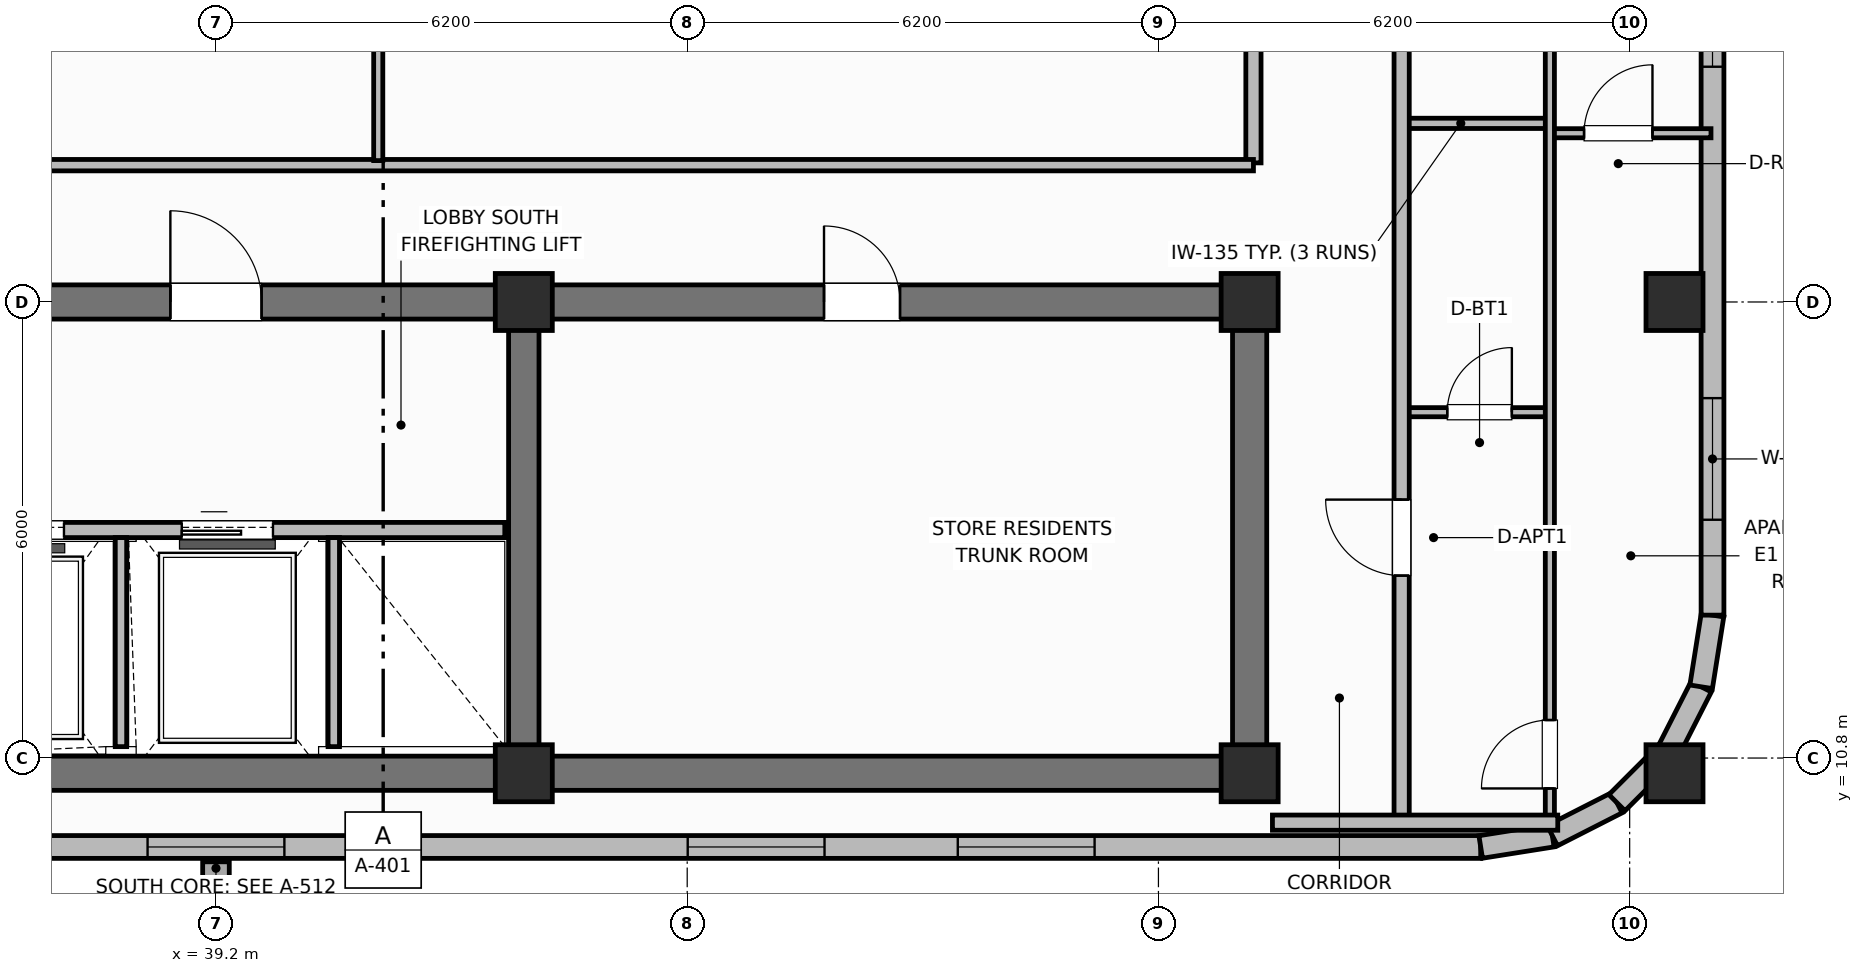
"""IFC4 building model, lengths in metres.
Left out: names, types, materials, properties, quantities, classifications, styles, units other than length and angle.
Written with IfcOpenShell. Run it as: python <this file> out.ifc"""

import sys

from ifc_helpers import new_model, si_unit, direction, frame, frame_2d, origin, origin_2d, place, context, subcontext, project, spatial, rectangle, extrude, element, fill, save


model = new_model("IFC4")
c1 = context("Model", 3, precision=1e-05, world=origin(), true_north=direction((0.0, 1.0)))
c2 = subcontext(c1, "Body", "Model", "MODEL_VIEW")
j1 = project(units=[si_unit("LENGTHUNIT", "METRE"), si_unit("PLANEANGLEUNIT", "RADIAN")], contexts=[c1])
p1 = place(None, origin())
s1 = spatial("IfcSite", under=j1, at=p1, CompositionType="ELEMENT")
p2 = place(p1, origin())
s2 = spatial("IfcBuilding", under=s1, at=p2, CompositionType="ELEMENT")
p3 = place(p2, frame((0.0, 0.0, 260.2)))
s3 = spatial("IfcBuildingStorey", under=s2, at=p3, CompositionType="ELEMENT", Elevation=260.2)
p4 = place(p3, frame((52.8, 10.6, 0.0), z_axis=(0.0, 0.0, 1.0), x_axis=(-1.0, 0.0, 0.0)))
e1 = element("IfcWall", 1, at=p4, inside=s3, PredefinedType="SHEAR", context=c2, shape_type="SweptSolid", body=[
    extrude(rectangle(XDim=27.2, YDim=0.45, at=frame_2d((13.6, 0.0))), origin(), (0.0, 0.0, 1.0), 3.7),
])
p5 = place(p3, frame((52.8, 10.825, 0.0), z_axis=(0.0, 0.0, 1.0), x_axis=(0.0, 1.0, 0.0)))
e2 = element("IfcWall", 2, at=p5, inside=s3, PredefinedType="SHEAR", context=c2, shape_type="SweptSolid", body=[
    extrude(rectangle(XDim=5.75, YDim=0.45, at=frame_2d((2.875, 0.0))), origin(), (0.0, 0.0, 1.0), 3.7),
])
p6 = place(p3, frame((25.6, 16.8, 0.0), z_axis=(0.0, 0.0, 1.0), x_axis=(1.0, 0.0, 0.0)))
e3 = element("IfcWall", 3, at=p6, inside=s3, PredefinedType="SHEAR", context=c2, shape_type="SweptSolid", body=[
    extrude(rectangle(XDim=27.2, YDim=0.45, at=frame_2d((13.6, 0.0))), origin(), (0.0, 0.0, 1.0), 3.7),
])
p7 = place(p6, frame((1.9, 0.0, 0.0)))
e4 = element("IfcOpeningElement", 4, at=p7, cuts=e3, PredefinedType="OPENING", context=c2, shape_type="SweptSolid", body=[
    extrude(rectangle(XDim=1.1, YDim=2.15, at=frame_2d((0.55, 1.075))), frame((0.0, 0.235, 0.0), z_axis=(0.0, -1.0, 0.0), x_axis=(1.0, 0.0, 0.0)), (0.0, 0.0, 1.0), 0.47),
])
p8 = place(p6, frame((13.0, 0.0, 0.0)))
e5 = element("IfcOpeningElement", 5, at=p8, cuts=e3, PredefinedType="OPENING", context=c2, shape_type="SweptSolid", body=[
    extrude(rectangle(XDim=1.2, YDim=2.15, at=frame_2d((0.6, 1.075))), frame((0.0, 0.235, 0.0), z_axis=(0.0, -1.0, 0.0), x_axis=(1.0, 0.0, 0.0)), (0.0, 0.0, 1.0), 0.47),
])
p9 = place(p6, frame((21.6, 0.0, 0.0)))
e6 = element("IfcOpeningElement", 6, at=p9, cuts=e3, PredefinedType="OPENING", context=c2, shape_type="SweptSolid", body=[
    extrude(rectangle(XDim=1.0, YDim=2.15, at=frame_2d((0.5, 1.075))), frame((0.0, 0.235, 0.0), z_axis=(0.0, -1.0, 0.0), x_axis=(1.0, 0.0, 0.0)), (0.0, 0.0, 1.0), 0.47),
])
p10 = place(p3, frame((43.25, 10.825, 0.0), z_axis=(0.0, 0.0, 1.0), x_axis=(0.0, 1.0, 0.0)))
e7 = element("IfcWall", 7, at=p10, inside=s3, PredefinedType="SHEAR", context=c2, shape_type="SweptSolid", body=[
    extrude(rectangle(XDim=5.75, YDim=0.4, at=frame_2d((2.875, 0.0))), origin(), (0.0, 0.0, 1.0), 3.7),
])
for number, where, z_axis, x_axis in (
    (8, (43.25, 10.6, 0.0), (0.0, 0.0, 1.0), (1.0, 0.0, 0.0)),
    (9, (43.25, 16.8, 0.0), (0.0, 0.0, 1.0), (1.0, 0.0, 0.0)),
    (10, (52.8, 10.6, 0.0), (0.0, 0.0, 1.0), (1.0, 0.0, 0.0)),
    (11, (52.8, 16.8, 0.0), (0.0, 0.0, 1.0), (1.0, 0.0, 0.0)),
    (12, (58.39, 10.6, 0.0), (0.0, 0.0, 1.0), (1.0, 0.0, 0.0)),
    (13, (58.39, 16.8, 0.0), (0.0, 0.0, 1.0), (1.0, 0.0, 0.0)),
):
    element("IfcColumn", number, at=place(p3, frame(where, z_axis=z_axis, x_axis=x_axis)), inside=s3, PredefinedType="COLUMN", context=c2, shape_type="SweptSolid", body=[
        extrude(rectangle(XDim=0.75, YDim=0.75, at=origin_2d()), origin(), (0.0, 0.0, 1.0), 3.7),
    ])
p11 = place(p3, frame((22.56, 9.63, 0.0), z_axis=(0.0, 0.0, 1.0), x_axis=(1.0, 0.0, 0.0)))
e14 = element("IfcWall", 14, at=p11, inside=s3, PredefinedType="SOLIDWALL", context=c2, shape_type="SweptSolid", body=[
    extrude(rectangle(XDim=33.28, YDim=0.3, at=frame_2d((16.64, 0.0))), origin(), (0.0, 0.0, 1.0), 2.73),
])
p12 = place(p11, frame((5.08, 0.0, 0.76)))
e15 = element("IfcOpeningElement", 15, at=p12, cuts=e14, PredefinedType="OPENING", context=c2, shape_type="SweptSolid", body=[
    extrude(rectangle(XDim=1.8, YDim=1.85, at=frame_2d((0.9, 0.925))), frame((0.0, 0.16, 0.0), z_axis=(0.0, -1.0, 0.0), x_axis=(1.0, 0.0, 0.0)), (0.0, 0.0, 1.0), 0.32),
])
p13 = place(p11, frame((8.633, 0.0, 0.76)))
e16 = element("IfcOpeningElement", 16, at=p13, cuts=e14, PredefinedType="OPENING", context=c2, shape_type="SweptSolid", body=[
    extrude(rectangle(XDim=1.8, YDim=1.85, at=frame_2d((0.9, 0.925))), frame((0.0, 0.16, 0.0), z_axis=(0.0, -1.0, 0.0), x_axis=(1.0, 0.0, 0.0)), (0.0, 0.0, 1.0), 0.32),
])
p14 = place(p11, frame((15.74, 0.0, 0.76)))
e17 = element("IfcOpeningElement", 17, at=p14, cuts=e14, PredefinedType="OPENING", context=c2, shape_type="SweptSolid", body=[
    extrude(rectangle(XDim=1.8, YDim=1.85, at=frame_2d((0.9, 0.925))), frame((0.0, 0.16, 0.0), z_axis=(0.0, -1.0, 0.0), x_axis=(1.0, 0.0, 0.0)), (0.0, 0.0, 1.0), 0.32),
])
p15 = place(p11, frame((22.847, 0.0, 0.76)))
e18 = element("IfcOpeningElement", 18, at=p15, cuts=e14, PredefinedType="OPENING", context=c2, shape_type="SweptSolid", body=[
    extrude(rectangle(XDim=1.8, YDim=1.85, at=frame_2d((0.9, 0.925))), frame((0.0, 0.16, 0.0), z_axis=(0.0, -1.0, 0.0), x_axis=(1.0, 0.0, 0.0)), (0.0, 0.0, 1.0), 0.32),
])
p16 = place(p11, frame((26.4, 0.0, 0.76)))
e19 = element("IfcOpeningElement", 19, at=p16, cuts=e14, PredefinedType="OPENING", context=c2, shape_type="SweptSolid", body=[
    extrude(rectangle(XDim=1.8, YDim=1.85, at=frame_2d((0.9, 0.925))), frame((0.0, 0.16, 0.0), z_axis=(0.0, -1.0, 0.0), x_axis=(1.0, 0.0, 0.0)), (0.0, 0.0, 1.0), 0.32),
])
p17 = place(p3, frame((55.84, 9.63, 0.0), z_axis=(0.0, 0.0, 1.0), x_axis=(0.987663181641, 0.156593229835, 0.0)))
e20 = element("IfcWall", 20, at=p17, inside=s3, PredefinedType="SOLIDWALL", context=c2, shape_type="SweptSolid", body=[
    extrude(rectangle(XDim=0.954, YDim=0.3, at=frame_2d((0.477, 0.0))), origin(), (0.0, 0.0, 1.0), 2.73),
])
for number, where, z_axis, x_axis in (
    (21, (56.782, 9.779, 0.0), (0.0, 0.0, 1.0), (0.891, 0.454, 0.0)),
    (22, (57.633, 10.212, 0.0), (0.0, 0.0, 1.0), (0.707, 0.707, 0.0)),
    (23, (58.308, 10.887, 0.0), (0.0, 0.0, 1.0), (0.454, 0.891, 0.0)),
):
    element("IfcWall", number, at=place(p3, frame(where, z_axis=z_axis, x_axis=x_axis)), inside=s3, PredefinedType="SOLIDWALL", context=c2, shape_type="SweptSolid", body=[
        extrude(rectangle(XDim=0.954, YDim=0.3, at=frame_2d((0.477, 0.0))), origin(), (0.0, 0.0, 1.0), 2.73),
    ])
p18 = place(p3, frame((58.741, 11.738, 0.0), z_axis=(0.0, 0.0, 1.0), x_axis=(0.156343617883, 0.987702725088, 0.0)))
e24 = element("IfcWall", 24, at=p18, inside=s3, PredefinedType="SOLIDWALL", context=c2, shape_type="SweptSolid", body=[
    extrude(rectangle(XDim=0.954, YDim=0.3, at=frame_2d((0.477, 0.0))), origin(), (0.0, 0.0, 1.0), 2.73),
])
p19 = place(p3, frame((58.89, 12.68, 0.0), z_axis=(0.0, 0.0, 1.0), x_axis=(0.0, 1.0, 0.0)))
e25 = element("IfcWall", 25, at=p19, inside=s3, PredefinedType="SOLIDWALL", context=c2, shape_type="SweptSolid", body=[
    extrude(rectangle(XDim=11.12, YDim=0.3, at=frame_2d((5.56, 0.0))), origin(), (0.0, 0.0, 1.0), 2.73),
])
p20 = place(p19, frame((1.255, 0.0, 0.71)))
e26 = element("IfcOpeningElement", 26, at=p20, cuts=e25, PredefinedType="OPENING", context=c2, shape_type="SweptSolid", body=[
    extrude(rectangle(XDim=1.6, YDim=1.9, at=frame_2d((0.8, 0.95))), frame((0.0, 0.16, 0.0), z_axis=(0.0, -1.0, 0.0), x_axis=(1.0, 0.0, 0.0)), (0.0, 0.0, 1.0), 0.32),
])
p21 = place(p19, frame((7.215, 0.0, 0.71)))
e27 = element("IfcOpeningElement", 27, at=p21, cuts=e25, PredefinedType="OPENING", context=c2, shape_type="SweptSolid", body=[
    extrude(rectangle(XDim=1.6, YDim=1.9, at=frame_2d((0.8, 0.95))), frame((0.0, 0.16, 0.0), z_axis=(0.0, -1.0, 0.0), x_axis=(1.0, 0.0, 0.0)), (0.0, 0.0, 1.0), 0.32),
])
p22 = place(p3, frame((35.4, 13.8, 0.0), z_axis=(0.0, 0.0, 1.0), x_axis=(1.0, 0.0, 0.0)))
e28 = element("IfcWall", 28, at=p22, inside=s3, PredefinedType="PARTITIONING", context=c2, shape_type="SweptSolid", body=[
    extrude(rectangle(XDim=7.6, YDim=0.2, at=frame_2d((3.8, 0.0))), origin(), (0.0, 0.0, 1.0), 2.33),
])
p23 = place(p22, frame((0.7, 0.0, 0.0)))
e29 = element("IfcOpeningElement", 29, at=p23, cuts=e28, PredefinedType="OPENING", context=c2, shape_type="SweptSolid", body=[
    extrude(rectangle(XDim=1.1, YDim=2.15, at=frame_2d((0.55, 1.075))), frame((0.0, 0.11, 0.0), z_axis=(0.0, -1.0, 0.0), x_axis=(1.0, 0.0, 0.0)), (0.0, 0.0, 1.0), 0.22),
])
p24 = place(p22, frame((3.35, 0.0, 0.0)))
e30 = element("IfcOpeningElement", 30, at=p24, cuts=e28, PredefinedType="OPENING", context=c2, shape_type="SweptSolid", body=[
    extrude(rectangle(XDim=1.2, YDim=2.15, at=frame_2d((0.6, 1.075))), frame((0.0, 0.11, 0.0), z_axis=(0.0, -1.0, 0.0), x_axis=(1.0, 0.0, 0.0)), (0.0, 0.0, 1.0), 0.22),
])
for number, where, z_axis, x_axis in (
    (31, (37.95, 10.95, 0.0), (0.0, 0.0, 1.0), (0.0, 1.0, 0.0)),
    (32, (40.75, 10.95, 0.0), (0.0, 0.0, 1.0), (0.0, 1.0, 0.0)),
):
    element("IfcWall", number, at=place(p3, frame(where, z_axis=z_axis, x_axis=x_axis)), inside=s3, PredefinedType="PARTITIONING", context=c2, shape_type="SweptSolid", body=[
        extrude(rectangle(XDim=2.75, YDim=0.15, at=frame_2d((1.375, 0.0))), origin(), (0.0, 0.0, 1.0), 2.56),
    ])
p25 = place(p3, frame((52.85, 18.63, 0.0), z_axis=(0.0, 0.0, 1.0), x_axis=(0.0, 1.0, 0.0)))
e33 = element("IfcWall", 33, at=p25, inside=s3, PredefinedType="PARTITIONING", context=c2, shape_type="SweptSolid", body=[
    extrude(rectangle(XDim=19.14, YDim=0.2, at=frame_2d((9.57, 0.0))), origin(), (0.0, 0.0, 1.0), 2.56),
])
p26 = place(p3, frame((29.9, 18.6, 0.0), z_axis=(0.0, 0.0, 1.0), x_axis=(1.0, 0.0, 0.0)))
e34 = element("IfcWall", 34, at=p26, inside=s3, PredefinedType="PARTITIONING", context=c2, shape_type="SweptSolid", body=[
    extrude(rectangle(XDim=22.95, YDim=0.15, at=frame_2d((11.475, 0.0))), origin(), (0.0, 0.0, 1.0), 2.56),
])
p27 = place(p3, frame((41.335, 18.66, 0.0), z_axis=(0.0, 0.0, 1.0), x_axis=(0.0, 1.0, 0.0)))
e35 = element("IfcWall", 35, at=p27, inside=s3, PredefinedType="PARTITIONING", context=c2, shape_type="SweptSolid", body=[
    extrude(rectangle(XDim=6.821, YDim=0.12, at=frame_2d((3.41, 0.0))), origin(), (0.0, 0.0, 1.0), 2.56),
])
p28 = place(p27, frame((2.0, 0.0, 0.0)))
e36 = element("IfcOpeningElement", 36, at=p28, cuts=e35, PredefinedType="OPENING", context=c2, shape_type="SweptSolid", body=[
    extrude(rectangle(XDim=0.9, YDim=2.1, at=frame_2d((0.45, 1.05))), frame((0.0, 0.07, 0.0), z_axis=(0.0, -1.0, 0.0), x_axis=(1.0, 0.0, 0.0)), (0.0, 0.0, 1.0), 0.14),
])
p29 = place(p3, frame((54.8, 15.35, 0.0), z_axis=(0.0, 0.0, 1.0), x_axis=(1.0, 0.0, 0.0)))
e37 = element("IfcWall", 37, at=p29, inside=s3, PredefinedType="PARTITIONING", context=c2, shape_type="SweptSolid", body=[
    extrude(rectangle(XDim=1.95, YDim=0.12, at=frame_2d((0.975, 0.0))), origin(), (0.0, 0.0, 1.0), 2.56),
])
p30 = place(p29, frame((0.6, 0.0, 0.0)))
e38 = element("IfcOpeningElement", 38, at=p30, cuts=e37, PredefinedType="OPENING", context=c2, shape_type="SweptSolid", body=[
    extrude(rectangle(XDim=0.85, YDim=2.1, at=frame_2d((0.425, 1.05))), frame((0.0, 0.07, 0.0), z_axis=(0.0, -1.0, 0.0), x_axis=(1.0, 0.0, 0.0)), (0.0, 0.0, 1.0), 0.14),
])
p31 = place(p3, frame((54.8, 19.15, 0.0), z_axis=(0.0, 0.0, 1.0), x_axis=(1.0, 0.0, 0.0)))
e39 = element("IfcWall", 39, at=p31, inside=s3, PredefinedType="PARTITIONING", context=c2, shape_type="SweptSolid", body=[
    extrude(rectangle(XDim=1.95, YDim=0.135, at=frame_2d((0.975, 0.0))), origin(), (0.0, 0.0, 1.0), 2.56),
])
p32 = place(p3, frame((56.75, 19.02, 0.0), z_axis=(0.0, 0.0, 1.0), x_axis=(1.0, 0.0, 0.0)))
e40 = element("IfcWall", 40, at=p32, inside=s3, PredefinedType="PARTITIONING", context=c2, shape_type="SweptSolid", body=[
    extrude(rectangle(XDim=2.12, YDim=0.12, at=frame_2d((1.06, 0.0))), origin(), (0.0, 0.0, 1.0), 2.56),
])
p33 = place(p32, frame((0.45, 0.0, 0.0)))
e41 = element("IfcOpeningElement", 41, at=p33, cuts=e40, PredefinedType="OPENING", context=c2, shape_type="SweptSolid", body=[
    extrude(rectangle(XDim=0.9, YDim=2.1, at=frame_2d((0.45, 1.05))), frame((0.0, 0.07, 0.0), z_axis=(0.0, -1.0, 0.0), x_axis=(1.0, 0.0, 0.0)), (0.0, 0.0, 1.0), 0.14),
])
p34 = place(p3, frame((56.75, 9.99, 0.0), z_axis=(0.0, 0.0, 1.0), x_axis=(0.0, 1.0, 0.0)))
e42 = element("IfcWall", 42, at=p34, inside=s3, PredefinedType="PARTITIONING", context=c2, shape_type="SweptSolid", body=[
    extrude(rectangle(XDim=36.42, YDim=0.12, at=frame_2d((18.21, 0.0))), origin(), (0.0, 0.0, 1.0), 2.56),
])
p35 = place(p34, frame((0.41, 0.0, 0.0)))
e43 = element("IfcOpeningElement", 43, at=p35, cuts=e42, PredefinedType="OPENING", context=c2, shape_type="SweptSolid", body=[
    extrude(rectangle(XDim=0.9, YDim=2.1, at=frame_2d((0.45, 1.05))), frame((0.0, 0.07, 0.0), z_axis=(0.0, -1.0, 0.0), x_axis=(1.0, 0.0, 0.0)), (0.0, 0.0, 1.0), 0.14),
])
p36 = place(p34, frame((15.56, 0.0, 0.0)))
e44 = element("IfcOpeningElement", 44, at=p36, cuts=e42, PredefinedType="OPENING", context=c2, shape_type="SweptSolid", body=[
    extrude(rectangle(XDim=0.82, YDim=2.08, at=frame_2d((0.41, 1.04))), frame((0.0, 0.07, 0.0), z_axis=(0.0, -1.0, 0.0), x_axis=(1.0, 0.0, 0.0)), (0.0, 0.0, 1.0), 0.14),
])
p37 = place(p3, frame((54.8, 9.95, 0.0), z_axis=(0.0, 0.0, 1.0), x_axis=(0.0, 1.0, 0.0)))
e45 = element("IfcWall", 45, at=p37, inside=s3, PredefinedType="PARTITIONING", context=c2, shape_type="SweptSolid", body=[
    extrude(rectangle(XDim=36.5, YDim=0.2, at=frame_2d((18.25, 0.0))), origin(), (0.0, 0.0, 1.0), 2.56),
])
p38 = place(p37, frame((3.25, 0.0, 0.0)))
e46 = element("IfcOpeningElement", 46, at=p38, cuts=e45, PredefinedType="OPENING", context=c2, shape_type="SweptSolid", body=[
    extrude(rectangle(XDim=1.0, YDim=2.15, at=frame_2d((0.5, 1.075))), frame((0.0, 0.11, 0.0), z_axis=(0.0, -1.0, 0.0), x_axis=(1.0, 0.0, 0.0)), (0.0, 0.0, 1.0), 0.22),
])
p39 = place(p3, frame((53.1, 9.95, 0.0), z_axis=(0.0, 0.0, 1.0), x_axis=(1.0, 0.0, 0.0)))
e47 = element("IfcWall", 47, at=p39, inside=s3, PredefinedType="PARTITIONING", context=c2, shape_type="SweptSolid", body=[
    extrude(rectangle(XDim=3.754, YDim=0.2, at=frame_2d((1.877, 0.0))), origin(), (0.0, 0.0, 1.0), 2.56),
])
p40 = place(p14, origin())
e48 = element("IfcWindow", 48, at=p40, inside=s3, PartitioningType="SINGLE_PANEL", PredefinedType="WINDOW", context=c2, shape_type="SweptSolid", body=[
    extrude(rectangle(XDim=1.8, YDim=1.85, at=frame_2d((0.9, 0.925))), frame((0.0, 0.03, 0.0), z_axis=(0.0, -1.0, 0.0), x_axis=(1.0, 0.0, 0.0)), (0.0, 0.0, 1.0), 0.06),
])
fill(e17, e48)
p41 = place(p15, origin())
e49 = element("IfcWindow", 49, at=p41, inside=s3, PartitioningType="SINGLE_PANEL", PredefinedType="WINDOW", context=c2, shape_type="SweptSolid", body=[
    extrude(rectangle(XDim=1.8, YDim=1.85, at=frame_2d((0.9, 0.925))), frame((0.0, 0.03, 0.0), z_axis=(0.0, -1.0, 0.0), x_axis=(1.0, 0.0, 0.0)), (0.0, 0.0, 1.0), 0.06),
])
fill(e18, e49)
p42 = place(p16, origin())
e50 = element("IfcWindow", 50, at=p42, inside=s3, PartitioningType="SINGLE_PANEL", PredefinedType="WINDOW", context=c2, shape_type="SweptSolid", body=[
    extrude(rectangle(XDim=1.8, YDim=1.85, at=frame_2d((0.9, 0.925))), frame((0.0, 0.03, 0.0), z_axis=(0.0, -1.0, 0.0), x_axis=(1.0, 0.0, 0.0)), (0.0, 0.0, 1.0), 0.06),
])
fill(e19, e50)
p43 = place(p20, origin())
e51 = element("IfcWindow", 51, at=p43, inside=s3, PartitioningType="SINGLE_PANEL", PredefinedType="WINDOW", context=c2, shape_type="SweptSolid", body=[
    extrude(rectangle(XDim=1.6, YDim=1.9, at=frame_2d((0.8, 0.95))), frame((0.0, 0.03, 0.0), z_axis=(0.0, -1.0, 0.0), x_axis=(1.0, 0.0, 0.0)), (0.0, 0.0, 1.0), 0.06),
])
fill(e26, e51)
p44 = place(p21, origin())
e52 = element("IfcWindow", 52, at=p44, inside=s3, PartitioningType="SINGLE_PANEL", PredefinedType="WINDOW", context=c2, shape_type="SweptSolid", body=[
    extrude(rectangle(XDim=1.6, YDim=1.9, at=frame_2d((0.8, 0.95))), frame((0.0, 0.03, 0.0), z_axis=(0.0, -1.0, 0.0), x_axis=(1.0, 0.0, 0.0)), (0.0, 0.0, 1.0), 0.06),
])
fill(e27, e52)
p45 = place(p23, origin())
e53 = element("IfcDoor", 53, at=p45, inside=s3, OperationType="SLIDING_TO_LEFT", PredefinedType="DOOR", context=c2, shape_type="SweptSolid", body=[
    extrude(rectangle(XDim=1.1, YDim=2.15, at=frame_2d((0.55, 1.075))), frame((0.0, 0.025, 0.0), z_axis=(0.0, -1.0, 0.0), x_axis=(1.0, 0.0, 0.0)), (0.0, 0.0, 1.0), 0.05),
])
fill(e29, e53)
p46 = place(p24, origin())
e54 = element("IfcDoor", 54, at=p46, inside=s3, OperationType="SLIDING_TO_LEFT", PredefinedType="DOOR", context=c2, shape_type="SweptSolid", body=[
    extrude(rectangle(XDim=1.2, YDim=2.15, at=frame_2d((0.6, 1.075))), frame((0.0, 0.025, 0.0), z_axis=(0.0, -1.0, 0.0), x_axis=(1.0, 0.0, 0.0)), (0.0, 0.0, 1.0), 0.05),
])
fill(e30, e54)
p47 = place(p30, origin())
e55 = element("IfcDoor", 55, at=p47, inside=s3, OperationType="SINGLE_SWING_RIGHT", PredefinedType="DOOR", context=c2, shape_type="SweptSolid", body=[
    extrude(rectangle(XDim=0.85, YDim=2.1, at=frame_2d((0.425, 1.05))), frame((0.0, 0.025, 0.0), z_axis=(0.0, -1.0, 0.0), x_axis=(1.0, 0.0, 0.0)), (0.0, 0.0, 1.0), 0.05),
])
fill(e38, e55)
p48 = place(p33, origin())
e56 = element("IfcDoor", 56, at=p48, inside=s3, OperationType="SINGLE_SWING_RIGHT", PredefinedType="DOOR", context=c2, shape_type="SweptSolid", body=[
    extrude(rectangle(XDim=0.9, YDim=2.1, at=frame_2d((0.45, 1.05))), frame((0.0, 0.025, 0.0), z_axis=(0.0, -1.0, 0.0), x_axis=(1.0, 0.0, 0.0)), (0.0, 0.0, 1.0), 0.05),
])
fill(e41, e56)
p49 = place(p35, origin())
e57 = element("IfcDoor", 57, at=p49, inside=s3, OperationType="SINGLE_SWING_LEFT", PredefinedType="DOOR", context=c2, shape_type="SweptSolid", body=[
    extrude(rectangle(XDim=0.9, YDim=2.1, at=frame_2d((0.45, 1.05))), frame((0.0, 0.025, 0.0), z_axis=(0.0, -1.0, 0.0), x_axis=(1.0, 0.0, 0.0)), (0.0, 0.0, 1.0), 0.05),
])
fill(e43, e57)
p50 = place(p38, origin())
e58 = element("IfcDoor", 58, at=p50, inside=s3, OperationType="SINGLE_SWING_RIGHT", PredefinedType="DOOR", context=c2, shape_type="SweptSolid", body=[
    extrude(rectangle(XDim=1.0, YDim=2.15, at=frame_2d((0.5, 1.075))), frame((0.0, 0.025, 0.0), z_axis=(0.0, -1.0, 0.0), x_axis=(1.0, 0.0, 0.0)), (0.0, 0.0, 1.0), 0.05),
])
fill(e46, e58)
p51 = place(p8, origin())
e59 = element("IfcDoor", 59, at=p51, inside=s3, OperationType="SINGLE_SWING_LEFT", PredefinedType="DOOR", context=c2, shape_type="SweptSolid", body=[
    extrude(rectangle(XDim=1.2, YDim=2.15, at=frame_2d((0.6, 1.075))), frame((0.0, 0.025, 0.0), z_axis=(0.0, -1.0, 0.0), x_axis=(1.0, 0.0, 0.0)), (0.0, 0.0, 1.0), 0.05),
])
fill(e5, e59)
p52 = place(p9, origin())
e60 = element("IfcDoor", 60, at=p52, inside=s3, OperationType="SINGLE_SWING_LEFT", PredefinedType="DOOR", context=c2, shape_type="SweptSolid", body=[
    extrude(rectangle(XDim=1.0, YDim=2.15, at=frame_2d((0.5, 1.075))), frame((0.0, 0.025, 0.0), z_axis=(0.0, -1.0, 0.0), x_axis=(1.0, 0.0, 0.0)), (0.0, 0.0, 1.0), 0.05),
])
fill(e6, e60)
save(model, sys.argv[1])
